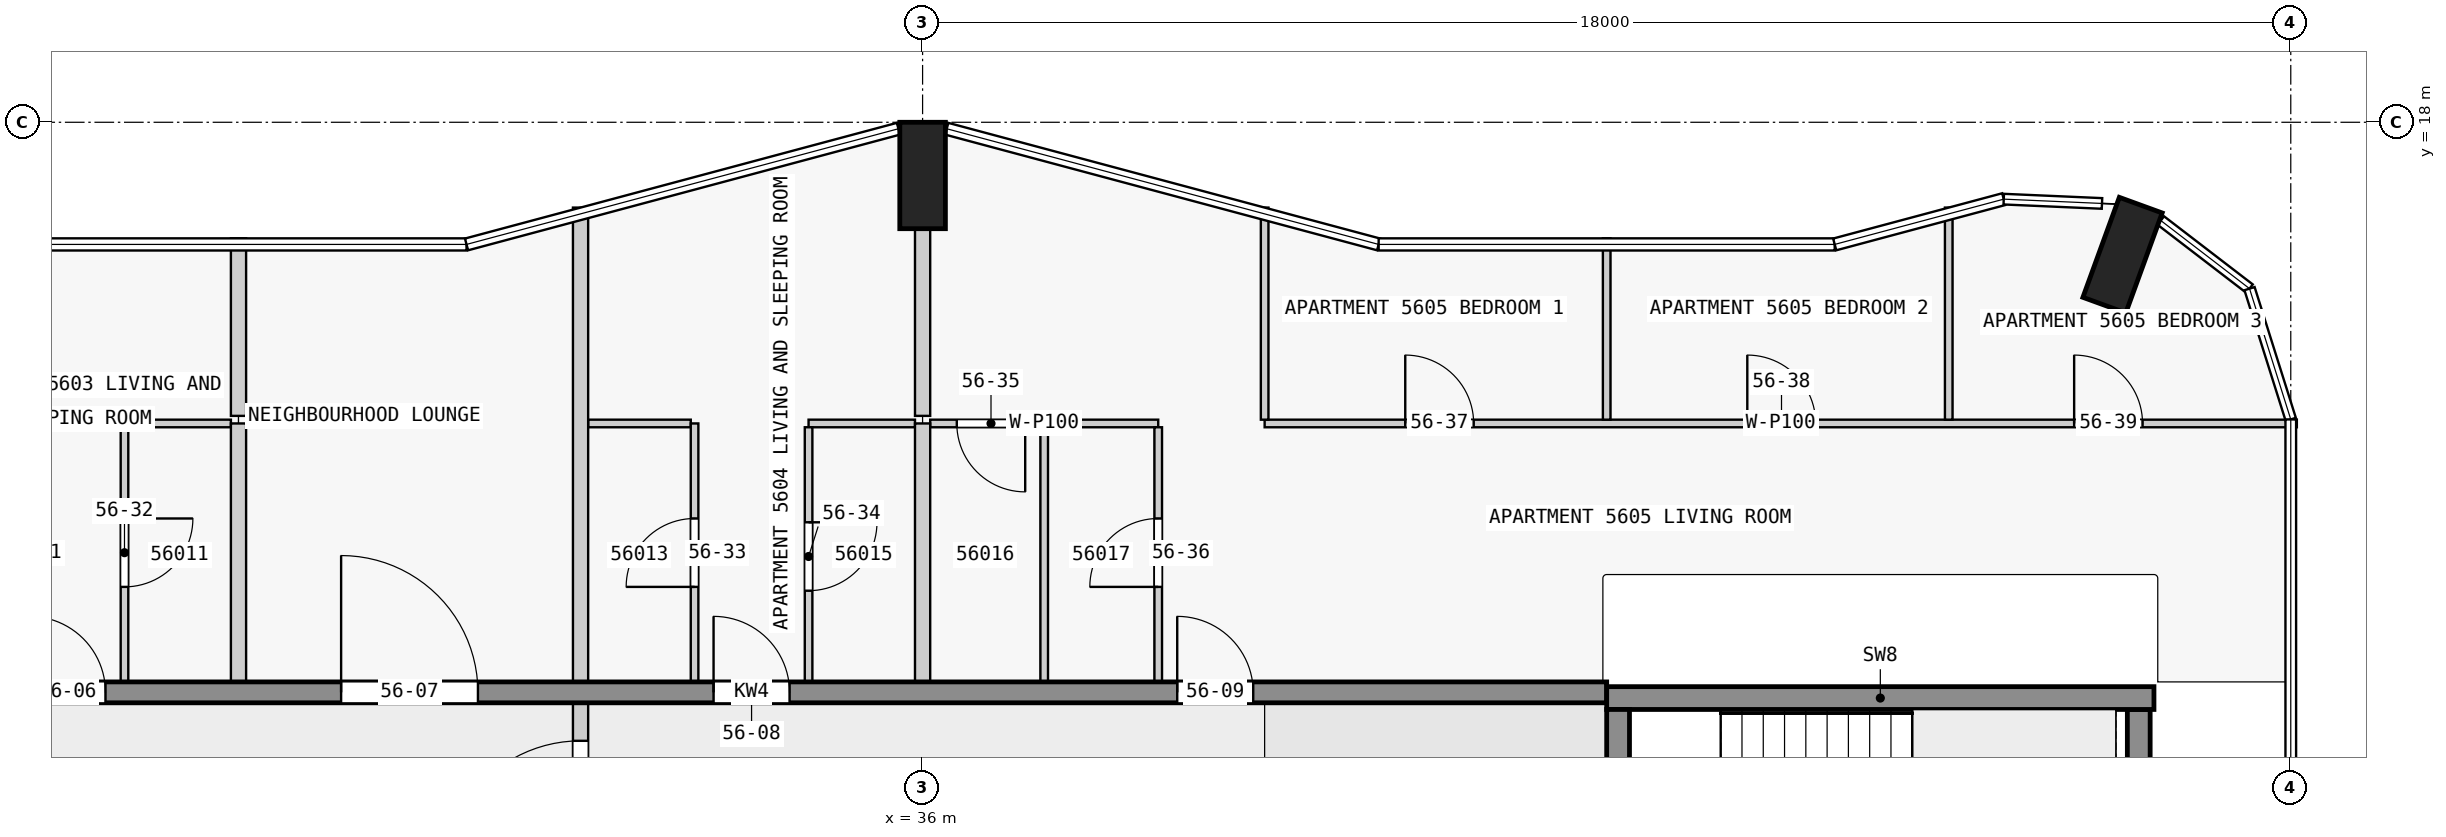
"""IFC4 building model, lengths in metres.
Left out: names, types, materials, properties, quantities, classifications, styles, units other than length and angle.
Written with IfcOpenShell. Run it as: python <this file> out.ifc"""

import sys

from ifc_helpers import new_model, si_unit, direction, frame, frame_2d, origin, origin_2d, place, context, subcontext, project, spatial, rectangle, extrude, element, fill, save


model = new_model("IFC4")
c1 = context("Model", 3, precision=1e-05, world=origin(), true_north=direction((0.0, 1.0)))
c2 = subcontext(c1, "Body", "Model", "MODEL_VIEW")
j1 = project(units=[si_unit("LENGTHUNIT", "METRE"), si_unit("PLANEANGLEUNIT", "RADIAN")], contexts=[c1])
p1 = place(None, origin())
s1 = spatial("IfcSite", under=j1, at=p1, CompositionType="ELEMENT")
p2 = place(p1, origin())
s2 = spatial("IfcBuilding", under=s1, at=p2, CompositionType="ELEMENT")
p3 = place(p2, frame((0.0, 0.0, 215.4)))
s3 = spatial("IfcBuildingStorey", under=s2, at=p3, CompositionType="ELEMENT", Elevation=215.4)
for number, where, z_axis, x_axis in (
    (1, (51.787, 16.252, 0.0), (0.0, 0.0, 1.0), (-0.94, 0.342, 0.0)),
    (2, (36.0, 17.3, 0.0), (0.0, 0.0, 1.0), (1.0, 0.0, 0.0)),
):
    element("IfcColumn", number, at=place(p3, frame(where, z_axis=z_axis, x_axis=x_axis)), inside=s3, PredefinedType="COLUMN", context=c2, shape_type="SweptSolid", body=[
        extrude(rectangle(XDim=0.6, YDim=1.4, at=origin_2d()), origin(), (0.0, 0.0, 1.0), 3.5),
    ])
p4 = place(p3, frame((45.15, 7.725, 0.0), z_axis=(0.0, 0.0, 1.0), x_axis=(0.0, 1.0, 0.0)))
e3 = element("IfcWall", 3, at=p4, inside=s3, PredefinedType="SHEAR", context=c2, shape_type="SweptSolid", body=[
    extrude(rectangle(XDim=2.55, YDim=0.3, at=frame_2d((1.275, 0.0))), origin(), (0.0, 0.0, 1.0), 3.5),
])
p5 = place(p4, frame((0.725, 0.0, 0.0)))
e4 = element("IfcOpeningElement", 4, at=p5, cuts=e3, PredefinedType="OPENING", context=c2, shape_type="SweptSolid", body=[
    extrude(rectangle(XDim=1.1, YDim=2.1, at=frame_2d((0.55, 1.05))), frame((0.0, 0.16, 0.0), z_axis=(0.0, -1.0, 0.0), x_axis=(1.0, 0.0, 0.0)), (0.0, 0.0, 1.0), 0.32),
])
p6 = place(p3, frame((52.0, 7.725, 0.0), z_axis=(0.0, 0.0, 1.0), x_axis=(0.0, 1.0, 0.0)))
e5 = element("IfcWall", 5, at=p6, inside=s3, PredefinedType="SHEAR", context=c2, shape_type="SweptSolid", body=[
    extrude(rectangle(XDim=2.55, YDim=0.3, at=frame_2d((1.275, 0.0))), origin(), (0.0, 0.0, 1.0), 3.5),
])
p7 = place(p3, frame((45.0, 10.425, 0.0), z_axis=(0.0, 0.0, 1.0), x_axis=(1.0, 0.0, 0.0)))
e6 = element("IfcWall", 6, at=p7, inside=s3, PredefinedType="SHEAR", context=c2, shape_type="SweptSolid", body=[
    extrude(rectangle(XDim=7.2, YDim=0.3, at=frame_2d((3.6, 0.0))), origin(), (0.0, 0.0, 1.0), 3.5),
])
p8 = place(p3, frame((22.5, 10.5, 0.0), z_axis=(0.0, 0.0, 1.0), x_axis=(1.0, 0.0, 0.0)))
e7 = element("IfcWall", 7, at=p8, inside=s3, PredefinedType="SHEAR", context=c2, shape_type="SweptSolid", body=[
    extrude(rectangle(XDim=22.5, YDim=0.275, at=frame_2d((11.25, 0.0))), origin(), (0.0, 0.0, 1.0), 3.25),
])
p9 = place(p8, frame((1.75, 0.0, 0.0)))
e8 = element("IfcOpeningElement", 8, at=p9, cuts=e7, PredefinedType="OPENING", context=c2, shape_type="SweptSolid", body=[
    extrude(rectangle(XDim=1.0, YDim=2.1, at=frame_2d((0.5, 1.05))), frame((0.0, 0.147, 0.0), z_axis=(0.0, -1.0, 0.0), x_axis=(1.0, 0.0, 0.0)), (0.0, 0.0, 1.0), 0.295),
])
p10 = place(p8, frame((5.85, 0.0, 0.0)))
e9 = element("IfcOpeningElement", 9, at=p10, cuts=e7, PredefinedType="OPENING", context=c2, shape_type="SweptSolid", body=[
    extrude(rectangle(XDim=1.8, YDim=2.1, at=frame_2d((0.9, 1.05))), frame((0.0, 0.147, 0.0), z_axis=(0.0, -1.0, 0.0), x_axis=(1.0, 0.0, 0.0)), (0.0, 0.0, 1.0), 0.295),
])
p11 = place(p8, frame((10.75, 0.0, 0.0)))
e10 = element("IfcOpeningElement", 10, at=p11, cuts=e7, PredefinedType="OPENING", context=c2, shape_type="SweptSolid", body=[
    extrude(rectangle(XDim=1.0, YDim=2.1, at=frame_2d((0.5, 1.05))), frame((0.0, 0.147, 0.0), z_axis=(0.0, -1.0, 0.0), x_axis=(1.0, 0.0, 0.0)), (0.0, 0.0, 1.0), 0.295),
])
p12 = place(p8, frame((16.85, 0.0, 0.0)))
e11 = element("IfcOpeningElement", 11, at=p12, cuts=e7, PredefinedType="OPENING", context=c2, shape_type="SweptSolid", body=[
    extrude(rectangle(XDim=1.0, YDim=2.1, at=frame_2d((0.5, 1.05))), frame((0.0, 0.147, 0.0), z_axis=(0.0, -1.0, 0.0), x_axis=(1.0, 0.0, 0.0)), (0.0, 0.0, 1.0), 0.295),
])
for number, where, z_axis, x_axis in (
    (12, (26.9, 14.038, 0.0), (0.0, 0.0, 1.0), (-1.0, 0.0, 0.0)),
    (13, (32.95, 14.038, 0.0), (0.0, 0.0, 1.0), (-1.0, 0.0, 0.0)),
):
    element("IfcWall", number, at=place(p3, frame(where, z_axis=z_axis, x_axis=x_axis)), inside=s3, PredefinedType="PARTITIONING", context=c2, shape_type="SweptSolid", body=[
        extrude(rectangle(XDim=1.35, YDim=0.1, at=frame_2d((0.675, 0.0))), origin(), (0.0, 0.0, 1.0), 3.25),
    ])
p13 = place(p3, frame((35.9, 14.038, 0.0), z_axis=(0.0, 0.0, 1.0), x_axis=(-1.0, 0.0, 0.0)))
e14 = element("IfcWall", 14, at=p13, inside=s3, PredefinedType="PARTITIONING", context=c2, shape_type="SweptSolid", body=[
    extrude(rectangle(XDim=1.4, YDim=0.1, at=frame_2d((0.7, 0.0))), origin(), (0.0, 0.0, 1.0), 3.25),
])
p14 = place(p3, frame((39.1, 14.038, 0.0), z_axis=(0.0, 0.0, 1.0), x_axis=(-1.0, 0.0, 0.0)))
e15 = element("IfcWall", 15, at=p14, inside=s3, PredefinedType="PARTITIONING", context=c2, shape_type="SweptSolid", body=[
    extrude(rectangle(XDim=3.0, YDim=0.1, at=frame_2d((1.5, 0.0))), origin(), (0.0, 0.0, 1.0), 3.25),
])
p15 = place(p14, frame((1.75, 0.0, 0.0)))
e16 = element("IfcOpeningElement", 16, at=p15, cuts=e15, PredefinedType="OPENING", context=c2, shape_type="SweptSolid", body=[
    extrude(rectangle(XDim=0.9, YDim=2.1, at=frame_2d((0.45, 1.05))), frame((0.0, 0.06, 0.0), z_axis=(0.0, -1.0, 0.0), x_axis=(1.0, 0.0, 0.0)), (0.0, 0.0, 1.0), 0.12),
])
p16 = place(p3, frame((40.5, 14.038, 0.0), z_axis=(0.0, 0.0, 1.0), x_axis=(1.0, 0.0, 0.0)))
e17 = element("IfcWall", 17, at=p16, inside=s3, PredefinedType="PARTITIONING", context=c2, shape_type="SweptSolid", body=[
    extrude(rectangle(XDim=13.58, YDim=0.1, at=frame_2d((6.79, 0.0))), origin(), (0.0, 0.0, 1.0), 3.25),
])
p17 = place(p16, frame((1.85, 0.0, 0.0)))
e18 = element("IfcOpeningElement", 18, at=p17, cuts=e17, PredefinedType="OPENING", context=c2, shape_type="SweptSolid", body=[
    extrude(rectangle(XDim=0.9, YDim=2.1, at=frame_2d((0.45, 1.05))), frame((0.0, 0.06, 0.0), z_axis=(0.0, -1.0, 0.0), x_axis=(1.0, 0.0, 0.0)), (0.0, 0.0, 1.0), 0.12),
])
p18 = place(p16, frame((6.35, 0.0, 0.0)))
e19 = element("IfcOpeningElement", 19, at=p18, cuts=e17, PredefinedType="OPENING", context=c2, shape_type="SweptSolid", body=[
    extrude(rectangle(XDim=0.9, YDim=2.1, at=frame_2d((0.45, 1.05))), frame((0.0, 0.06, 0.0), z_axis=(0.0, -1.0, 0.0), x_axis=(1.0, 0.0, 0.0)), (0.0, 0.0, 1.0), 0.12),
])
p19 = place(p16, frame((10.65, 0.0, 0.0)))
e20 = element("IfcOpeningElement", 20, at=p19, cuts=e17, PredefinedType="OPENING", context=c2, shape_type="SweptSolid", body=[
    extrude(rectangle(XDim=0.9, YDim=2.1, at=frame_2d((0.45, 1.05))), frame((0.0, 0.06, 0.0), z_axis=(0.0, -1.0, 0.0), x_axis=(1.0, 0.0, 0.0)), (0.0, 0.0, 1.0), 0.12),
])
p20 = place(p3, frame((25.5, 14.038, 0.0), z_axis=(0.0, 0.0, 1.0), x_axis=(0.0, -1.0, 0.0)))
e21 = element("IfcWall", 21, at=p20, inside=s3, PredefinedType="PARTITIONING", context=c2, shape_type="SweptSolid", body=[
    extrude(rectangle(XDim=3.4, YDim=0.1, at=frame_2d((1.7, 0.0))), origin(), (0.0, 0.0, 1.0), 3.25),
])
p21 = place(p20, frame((1.25, 0.0, 0.0)))
e22 = element("IfcOpeningElement", 22, at=p21, cuts=e21, PredefinedType="OPENING", context=c2, shape_type="SweptSolid", body=[
    extrude(rectangle(XDim=0.9, YDim=2.1, at=frame_2d((0.45, 1.05))), frame((0.0, 0.06, 0.0), z_axis=(0.0, -1.0, 0.0), x_axis=(1.0, 0.0, 0.0)), (0.0, 0.0, 1.0), 0.12),
])
p22 = place(p3, frame((27.0, 16.473, 0.0), z_axis=(0.0, 0.0, 1.0), x_axis=(0.0, -1.0, 0.0)))
e23 = element("IfcWall", 23, at=p22, inside=s3, PredefinedType="PARTITIONING", context=c2, shape_type="SweptSolid", body=[
    extrude(rectangle(XDim=2.336, YDim=0.2, at=frame_2d((1.168, 0.0))), origin(), (0.0, 0.0, 1.0), 3.25),
])
p23 = place(p3, frame((27.0, 10.637, 0.0), z_axis=(0.0, 0.0, 1.0), x_axis=(0.0, 1.0, 0.0)))
e24 = element("IfcWall", 24, at=p23, inside=s3, PredefinedType="PARTITIONING", context=c2, shape_type="SweptSolid", body=[
    extrude(rectangle(XDim=3.4, YDim=0.2, at=frame_2d((1.7, 0.0))), origin(), (0.0, 0.0, 1.0), 3.25),
])
p24 = place(p3, frame((31.5, 10.637, 0.0), z_axis=(0.0, 0.0, 1.0), x_axis=(0.0, 1.0, 0.0)))
e25 = element("IfcWall", 25, at=p24, inside=s3, PredefinedType="PARTITIONING", context=c2, shape_type="SweptSolid", body=[
    extrude(rectangle(XDim=6.24, YDim=0.2, at=frame_2d((3.12, 0.0))), origin(), (0.0, 0.0, 1.0), 3.25),
])
p25 = place(p3, frame((33.0, 10.637, 0.0), z_axis=(0.0, 0.0, 1.0), x_axis=(0.0, 1.0, 0.0)))
e26 = element("IfcWall", 26, at=p25, inside=s3, PredefinedType="PARTITIONING", context=c2, shape_type="SweptSolid", body=[
    extrude(rectangle(XDim=3.4, YDim=0.1, at=frame_2d((1.7, 0.0))), origin(), (0.0, 0.0, 1.0), 3.25),
])
p26 = place(p25, frame((1.25, 0.0, 0.0)))
e27 = element("IfcOpeningElement", 27, at=p26, cuts=e26, PredefinedType="OPENING", context=c2, shape_type="SweptSolid", body=[
    extrude(rectangle(XDim=0.9, YDim=2.1, at=frame_2d((0.45, 1.05))), frame((0.0, 0.06, 0.0), z_axis=(0.0, -1.0, 0.0), x_axis=(1.0, 0.0, 0.0)), (0.0, 0.0, 1.0), 0.12),
])
p27 = place(p3, frame((34.5, 13.988, 0.0), z_axis=(0.0, 0.0, 1.0), x_axis=(0.0, -1.0, 0.0)))
e28 = element("IfcWall", 28, at=p27, inside=s3, PredefinedType="PARTITIONING", context=c2, shape_type="SweptSolid", body=[
    extrude(rectangle(XDim=3.35, YDim=0.1, at=frame_2d((1.675, 0.0))), origin(), (0.0, 0.0, 1.0), 3.25),
])
p28 = place(p27, frame((1.25, 0.0, 0.0)))
e29 = element("IfcOpeningElement", 29, at=p28, cuts=e28, PredefinedType="OPENING", context=c2, shape_type="SweptSolid", body=[
    extrude(rectangle(XDim=0.9, YDim=2.1, at=frame_2d((0.45, 1.05))), frame((0.0, 0.06, 0.0), z_axis=(0.0, -1.0, 0.0), x_axis=(1.0, 0.0, 0.0)), (0.0, 0.0, 1.0), 0.12),
])
p29 = place(p3, frame((36.0, 16.6, 0.0), z_axis=(0.0, 0.0, 1.0), x_axis=(0.0, -1.0, 0.0)))
e30 = element("IfcWall", 30, at=p29, inside=s3, PredefinedType="PARTITIONING", context=c2, shape_type="SweptSolid", body=[
    extrude(rectangle(XDim=2.463, YDim=0.2, at=frame_2d((1.231, 0.0))), origin(), (0.0, 0.0, 1.0), 3.25),
])
p30 = place(p3, frame((36.0, 10.637, 0.0), z_axis=(0.0, 0.0, 1.0), x_axis=(0.0, 1.0, 0.0)))
e31 = element("IfcWall", 31, at=p30, inside=s3, PredefinedType="PARTITIONING", context=c2, shape_type="SweptSolid", body=[
    extrude(rectangle(XDim=3.4, YDim=0.2, at=frame_2d((1.7, 0.0))), origin(), (0.0, 0.0, 1.0), 3.25),
])
p31 = place(p3, frame((37.6, 10.637, 0.0), z_axis=(0.0, 0.0, 1.0), x_axis=(0.0, 1.0, 0.0)))
e32 = element("IfcWall", 32, at=p31, inside=s3, PredefinedType="PARTITIONING", context=c2, shape_type="SweptSolid", body=[
    extrude(rectangle(XDim=3.35, YDim=0.1, at=frame_2d((1.675, 0.0))), origin(), (0.0, 0.0, 1.0), 3.25),
])
p32 = place(p3, frame((39.1, 10.637, 0.0), z_axis=(0.0, 0.0, 1.0), x_axis=(0.0, 1.0, 0.0)))
e33 = element("IfcWall", 33, at=p32, inside=s3, PredefinedType="PARTITIONING", context=c2, shape_type="SweptSolid", body=[
    extrude(rectangle(XDim=3.35, YDim=0.1, at=frame_2d((1.675, 0.0))), origin(), (0.0, 0.0, 1.0), 3.25),
])
p33 = place(p32, frame((1.25, 0.0, 0.0)))
e34 = element("IfcOpeningElement", 34, at=p33, cuts=e33, PredefinedType="OPENING", context=c2, shape_type="SweptSolid", body=[
    extrude(rectangle(XDim=0.9, YDim=2.1, at=frame_2d((0.45, 1.05))), frame((0.0, 0.06, 0.0), z_axis=(0.0, -1.0, 0.0), x_axis=(1.0, 0.0, 0.0)), (0.0, 0.0, 1.0), 0.12),
])
p34 = place(p3, frame((40.5, 16.878, 0.0), z_axis=(0.0, 0.0, 1.0), x_axis=(0.0, -1.0, 0.0)))
e35 = element("IfcWall", 35, at=p34, inside=s3, PredefinedType="PARTITIONING", context=c2, shape_type="SweptSolid", body=[
    extrude(rectangle(XDim=2.79, YDim=0.1, at=frame_2d((1.395, 0.0))), origin(), (0.0, 0.0, 1.0), 3.25),
])
p35 = place(p3, frame((45.0, 14.087, 0.0), z_axis=(0.0, 0.0, 1.0), x_axis=(0.0, 1.0, 0.0)))
e36 = element("IfcWall", 36, at=p35, inside=s3, PredefinedType="PARTITIONING", context=c2, shape_type="SweptSolid", body=[
    extrude(rectangle(XDim=2.386, YDim=0.1, at=frame_2d((1.193, 0.0))), origin(), (0.0, 0.0, 1.0), 3.25),
])
p36 = place(p3, frame((49.5, 14.087, 0.0), z_axis=(0.0, 0.0, 1.0), x_axis=(0.0, 1.0, 0.0)))
e37 = element("IfcWall", 37, at=p36, inside=s3, PredefinedType="PARTITIONING", context=c2, shape_type="SweptSolid", body=[
    extrude(rectangle(XDim=2.79, YDim=0.1, at=frame_2d((1.395, 0.0))), origin(), (0.0, 0.0, 1.0), 3.25),
])
p37 = place(p3, frame((31.5, 7.462, 0.0), z_axis=(0.0, 0.0, 1.0), x_axis=(0.0, 1.0, 0.0)))
e38 = element("IfcWall", 38, at=p37, inside=s3, PredefinedType="PARTITIONING", context=c2, shape_type="SweptSolid", body=[
    extrude(rectangle(XDim=3.075, YDim=0.2, at=frame_2d((1.538, 0.0))), origin(), (0.0, 0.0, 1.0), 3.25),
])
p38 = place(p37, frame((0.6, 0.0, 0.0)))
e39 = element("IfcOpeningElement", 39, at=p38, cuts=e38, PredefinedType="OPENING", context=c2, shape_type="SweptSolid", body=[
    extrude(rectangle(XDim=1.8, YDim=2.1, at=frame_2d((0.9, 1.05))), frame((0.0, 0.11, 0.0), z_axis=(0.0, -1.0, 0.0), x_axis=(1.0, 0.0, 0.0)), (0.0, 0.0, 1.0), 0.22),
])
p39 = place(p9, origin())
e40 = element("IfcDoor", 40, at=p39, inside=s3, OperationType="SINGLE_SWING_LEFT", PredefinedType="DOOR", context=c2, shape_type="SweptSolid", body=[
    extrude(rectangle(XDim=1.0, YDim=2.1, at=frame_2d((0.5, 1.05))), frame((0.0, 0.025, 0.0), z_axis=(0.0, -1.0, 0.0), x_axis=(1.0, 0.0, 0.0)), (0.0, 0.0, 1.0), 0.05),
])
fill(e8, e40)
p40 = place(p10, origin())
e41 = element("IfcDoor", 41, at=p40, inside=s3, OperationType="SINGLE_SWING_LEFT", PredefinedType="DOOR", context=c2, shape_type="SweptSolid", body=[
    extrude(rectangle(XDim=1.8, YDim=2.1, at=frame_2d((0.9, 1.05))), frame((0.0, 0.025, 0.0), z_axis=(0.0, -1.0, 0.0), x_axis=(1.0, 0.0, 0.0)), (0.0, 0.0, 1.0), 0.05),
])
fill(e9, e41)
p41 = place(p11, origin())
e42 = element("IfcDoor", 42, at=p41, inside=s3, OperationType="SINGLE_SWING_LEFT", PredefinedType="DOOR", context=c2, shape_type="SweptSolid", body=[
    extrude(rectangle(XDim=1.0, YDim=2.1, at=frame_2d((0.5, 1.05))), frame((0.0, 0.025, 0.0), z_axis=(0.0, -1.0, 0.0), x_axis=(1.0, 0.0, 0.0)), (0.0, 0.0, 1.0), 0.05),
])
fill(e10, e42)
p42 = place(p12, origin())
e43 = element("IfcDoor", 43, at=p42, inside=s3, OperationType="SINGLE_SWING_RIGHT", PredefinedType="DOOR", context=c2, shape_type="SweptSolid", body=[
    extrude(rectangle(XDim=1.0, YDim=2.1, at=frame_2d((0.5, 1.05))), frame((0.0, 0.025, 0.0), z_axis=(0.0, -1.0, 0.0), x_axis=(1.0, 0.0, 0.0)), (0.0, 0.0, 1.0), 0.05),
])
fill(e11, e43)
p43 = place(p38, origin())
e44 = element("IfcDoor", 44, at=p43, inside=s3, OperationType="SINGLE_SWING_LEFT", PredefinedType="DOOR", context=c2, shape_type="SweptSolid", body=[
    extrude(rectangle(XDim=1.8, YDim=2.1, at=frame_2d((0.9, 1.05))), frame((0.0, 0.025, 0.0), z_axis=(0.0, -1.0, 0.0), x_axis=(1.0, 0.0, 0.0)), (0.0, 0.0, 1.0), 0.05),
])
fill(e39, e44)
p44 = place(p21, origin())
e45 = element("IfcDoor", 45, at=p44, inside=s3, OperationType="SINGLE_SWING_LEFT", PredefinedType="DOOR", context=c2, shape_type="SweptSolid", body=[
    extrude(rectangle(XDim=0.9, YDim=2.1, at=frame_2d((0.45, 1.05))), frame((0.0, 0.025, 0.0), z_axis=(0.0, -1.0, 0.0), x_axis=(1.0, 0.0, 0.0)), (0.0, 0.0, 1.0), 0.05),
])
fill(e22, e45)
p45 = place(p26, origin())
e46 = element("IfcDoor", 46, at=p45, inside=s3, OperationType="SINGLE_SWING_LEFT", PredefinedType="DOOR", context=c2, shape_type="SweptSolid", body=[
    extrude(rectangle(XDim=0.9, YDim=2.1, at=frame_2d((0.45, 1.05))), frame((0.0, 0.025, 0.0), z_axis=(0.0, -1.0, 0.0), x_axis=(1.0, 0.0, 0.0)), (0.0, 0.0, 1.0), 0.05),
])
fill(e27, e46)
p46 = place(p28, origin())
e47 = element("IfcDoor", 47, at=p46, inside=s3, OperationType="SINGLE_SWING_RIGHT", PredefinedType="DOOR", context=c2, shape_type="SweptSolid", body=[
    extrude(rectangle(XDim=0.9, YDim=2.1, at=frame_2d((0.45, 1.05))), frame((0.0, 0.025, 0.0), z_axis=(0.0, -1.0, 0.0), x_axis=(1.0, 0.0, 0.0)), (0.0, 0.0, 1.0), 0.05),
])
fill(e29, e47)
p47 = place(p15, origin())
e48 = element("IfcDoor", 48, at=p47, inside=s3, OperationType="SINGLE_SWING_RIGHT", PredefinedType="DOOR", context=c2, shape_type="SweptSolid", body=[
    extrude(rectangle(XDim=0.9, YDim=2.1, at=frame_2d((0.45, 1.05))), frame((0.0, 0.025, 0.0), z_axis=(0.0, -1.0, 0.0), x_axis=(1.0, 0.0, 0.0)), (0.0, 0.0, 1.0), 0.05),
])
fill(e16, e48)
p48 = place(p33, origin())
e49 = element("IfcDoor", 49, at=p48, inside=s3, OperationType="SINGLE_SWING_RIGHT", PredefinedType="DOOR", context=c2, shape_type="SweptSolid", body=[
    extrude(rectangle(XDim=0.9, YDim=2.1, at=frame_2d((0.45, 1.05))), frame((0.0, 0.025, 0.0), z_axis=(0.0, -1.0, 0.0), x_axis=(1.0, 0.0, 0.0)), (0.0, 0.0, 1.0), 0.05),
])
fill(e34, e49)
p49 = place(p17, origin())
e50 = element("IfcDoor", 50, at=p49, inside=s3, OperationType="SINGLE_SWING_LEFT", PredefinedType="DOOR", context=c2, shape_type="SweptSolid", body=[
    extrude(rectangle(XDim=0.9, YDim=2.1, at=frame_2d((0.45, 1.05))), frame((0.0, 0.025, 0.0), z_axis=(0.0, -1.0, 0.0), x_axis=(1.0, 0.0, 0.0)), (0.0, 0.0, 1.0), 0.05),
])
fill(e18, e50)
p50 = place(p18, origin())
e51 = element("IfcDoor", 51, at=p50, inside=s3, OperationType="SINGLE_SWING_RIGHT", PredefinedType="DOOR", context=c2, shape_type="SweptSolid", body=[
    extrude(rectangle(XDim=0.9, YDim=2.1, at=frame_2d((0.45, 1.05))), frame((0.0, 0.025, 0.0), z_axis=(0.0, -1.0, 0.0), x_axis=(1.0, 0.0, 0.0)), (0.0, 0.0, 1.0), 0.05),
])
fill(e19, e51)
p51 = place(p19, origin())
e52 = element("IfcDoor", 52, at=p51, inside=s3, OperationType="SINGLE_SWING_RIGHT", PredefinedType="DOOR", context=c2, shape_type="SweptSolid", body=[
    extrude(rectangle(XDim=0.9, YDim=2.1, at=frame_2d((0.45, 1.05))), frame((0.0, 0.025, 0.0), z_axis=(0.0, -1.0, 0.0), x_axis=(1.0, 0.0, 0.0)), (0.0, 0.0, 1.0), 0.05),
])
fill(e20, e52)
save(model, sys.argv[1])
